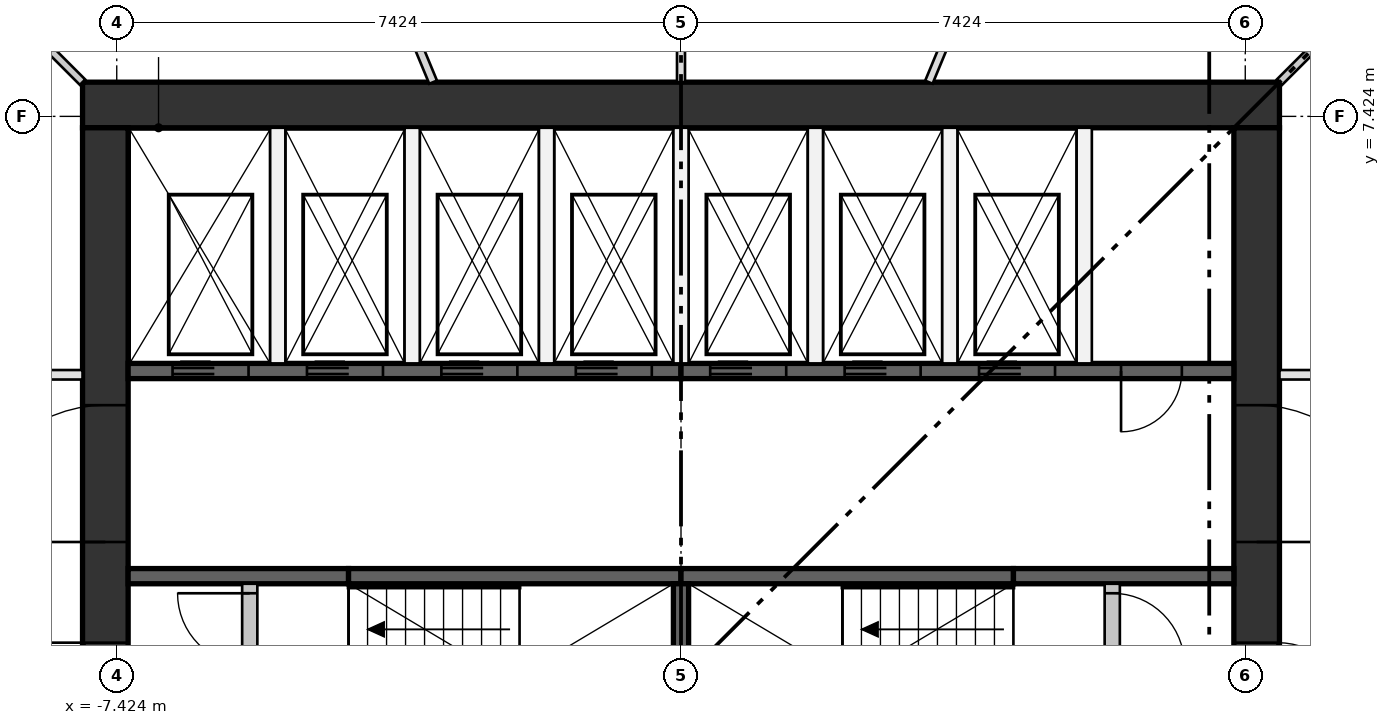
"""IFC4 building model, lengths in metres.
Left out: names, types, materials, properties, quantities, classifications, styles, units other than length and angle.
Written with IfcOpenShell. Run it as: python <this file> out.ifc"""

import sys

from ifc_helpers import new_model, si_unit, direction, frame, frame_2d, origin, place, context, subcontext, project, spatial, rectangle, extrude, element, fill, save


model = new_model("IFC4")
c1 = context("Model", 3, precision=1e-05, world=origin(), true_north=direction((0.0, 1.0)))
c2 = subcontext(c1, "Body", "Model", "MODEL_VIEW")
j1 = project(units=[si_unit("LENGTHUNIT", "METRE"), si_unit("PLANEANGLEUNIT", "RADIAN")], contexts=[c1])
p1 = place(None, origin())
s1 = spatial("IfcSite", under=j1, at=p1, CompositionType="ELEMENT")
p2 = place(p1, origin())
s2 = spatial("IfcBuilding", under=s1, at=p2, CompositionType="ELEMENT")
p3 = place(p2, frame((0.0, 0.0, 137.7)))
s3 = spatial("IfcBuildingStorey", under=s2, at=p3, CompositionType="ELEMENT", Elevation=137.7)
p4 = place(p3, frame((-7.874, 7.574, 0.0), z_axis=(0.0, 0.0, 1.0), x_axis=(1.0, 0.0, 0.0)))
e1 = element("IfcWall", 1, at=p4, inside=s3, PredefinedType="SHEAR", context=c2, shape_type="SweptSolid", body=[
    extrude(rectangle(XDim=15.748, YDim=0.6, at=frame_2d((7.874, 0.0))), origin(), (0.0, 0.0, 1.0), 3.35),
])
p5 = place(p3, frame((-7.574, -7.274, 0.0), z_axis=(0.0, 0.0, 1.0), x_axis=(0.0, 1.0, 0.0)))
e2 = element("IfcWall", 2, at=p5, inside=s3, PredefinedType="SHEAR", context=c2, shape_type="SweptSolid", body=[
    extrude(rectangle(XDim=14.548, YDim=0.6, at=frame_2d((7.274, 0.0))), origin(), (0.0, 0.0, 1.0), 3.35),
])
p6 = place(p5, frame((6.774, 0.0, 0.0)))
e3 = element("IfcOpeningElement", 3, at=p6, cuts=e2, PredefinedType="OPENING", context=c2, shape_type="SweptSolid", body=[
    extrude(rectangle(XDim=1.0, YDim=2.1, at=frame_2d((0.5, 1.05))), frame((0.0, 0.31, 0.0), z_axis=(0.0, -1.0, 0.0), x_axis=(1.0, 0.0, 0.0)), (0.0, 0.0, 1.0), 0.62),
])
p7 = place(p5, frame((3.649, 0.0, 0.0)))
e4 = element("IfcOpeningElement", 4, at=p7, cuts=e2, PredefinedType="OPENING", context=c2, shape_type="SweptSolid", body=[
    extrude(rectangle(XDim=1.8, YDim=2.1, at=frame_2d((0.9, 1.05))), frame((0.0, 0.31, 0.0), z_axis=(0.0, -1.0, 0.0), x_axis=(1.0, 0.0, 0.0)), (0.0, 0.0, 1.0), 0.62),
])
p8 = place(p5, frame((9.098, 0.0, 0.0)))
e5 = element("IfcOpeningElement", 5, at=p8, cuts=e2, PredefinedType="OPENING", context=c2, shape_type="SweptSolid", body=[
    extrude(rectangle(XDim=1.8, YDim=2.1, at=frame_2d((0.9, 1.05))), frame((0.0, 0.31, 0.0), z_axis=(0.0, -1.0, 0.0), x_axis=(1.0, 0.0, 0.0)), (0.0, 0.0, 1.0), 0.62),
])
p9 = place(p3, frame((7.574, -7.274, 0.0), z_axis=(0.0, 0.0, 1.0), x_axis=(0.0, 1.0, 0.0)))
e6 = element("IfcWall", 6, at=p9, inside=s3, PredefinedType="SHEAR", context=c2, shape_type="SweptSolid", body=[
    extrude(rectangle(XDim=14.548, YDim=0.6, at=frame_2d((7.274, 0.0))), origin(), (0.0, 0.0, 1.0), 3.35),
])
p10 = place(p9, frame((6.774, 0.0, 0.0)))
e7 = element("IfcOpeningElement", 7, at=p10, cuts=e6, PredefinedType="OPENING", context=c2, shape_type="SweptSolid", body=[
    extrude(rectangle(XDim=1.0, YDim=2.1, at=frame_2d((0.5, 1.05))), frame((0.0, 0.31, 0.0), z_axis=(0.0, -1.0, 0.0), x_axis=(1.0, 0.0, 0.0)), (0.0, 0.0, 1.0), 0.62),
])
p11 = place(p9, frame((3.649, 0.0, 0.0)))
e8 = element("IfcOpeningElement", 8, at=p11, cuts=e6, PredefinedType="OPENING", context=c2, shape_type="SweptSolid", body=[
    extrude(rectangle(XDim=1.8, YDim=2.1, at=frame_2d((0.9, 1.05))), frame((0.0, 0.31, 0.0), z_axis=(0.0, -1.0, 0.0), x_axis=(1.0, 0.0, 0.0)), (0.0, 0.0, 1.0), 0.62),
])
p12 = place(p9, frame((9.098, 0.0, 0.0)))
e9 = element("IfcOpeningElement", 9, at=p12, cuts=e6, PredefinedType="OPENING", context=c2, shape_type="SweptSolid", body=[
    extrude(rectangle(XDim=1.8, YDim=2.1, at=frame_2d((0.9, 1.05))), frame((0.0, 0.31, 0.0), z_axis=(0.0, -1.0, 0.0), x_axis=(1.0, 0.0, 0.0)), (0.0, 0.0, 1.0), 0.62),
])
p13 = place(p3, frame((-7.274, 4.074, 0.0), z_axis=(0.0, 0.0, 1.0), x_axis=(1.0, 0.0, 0.0)))
e10 = element("IfcWall", 10, at=p13, inside=s3, PredefinedType="SHEAR", context=c2, shape_type="SweptSolid", body=[
    extrude(rectangle(XDim=7.274, YDim=0.2, at=frame_2d((3.637, 0.0))), origin(), (0.0, 0.0, 1.0), 3.0),
])
p14 = place(p13, frame((0.584, 0.0, 0.0)))
e11 = element("IfcOpeningElement", 11, at=p14, cuts=e10, PredefinedType="OPENING", context=c2, shape_type="SweptSolid", body=[
    extrude(rectangle(XDim=1.0, YDim=2.1, at=frame_2d((0.5, 1.05))), frame((0.0, 0.11, 0.0), z_axis=(0.0, -1.0, 0.0), x_axis=(1.0, 0.0, 0.0)), (0.0, 0.0, 1.0), 0.22),
])
p15 = place(p13, frame((2.353, 0.0, 0.0)))
e12 = element("IfcOpeningElement", 12, at=p15, cuts=e10, PredefinedType="OPENING", context=c2, shape_type="SweptSolid", body=[
    extrude(rectangle(XDim=1.0, YDim=2.1, at=frame_2d((0.5, 1.05))), frame((0.0, 0.11, 0.0), z_axis=(0.0, -1.0, 0.0), x_axis=(1.0, 0.0, 0.0)), (0.0, 0.0, 1.0), 0.22),
])
p16 = place(p13, frame((4.121, 0.0, 0.0)))
e13 = element("IfcOpeningElement", 13, at=p16, cuts=e10, PredefinedType="OPENING", context=c2, shape_type="SweptSolid", body=[
    extrude(rectangle(XDim=1.0, YDim=2.1, at=frame_2d((0.5, 1.05))), frame((0.0, 0.11, 0.0), z_axis=(0.0, -1.0, 0.0), x_axis=(1.0, 0.0, 0.0)), (0.0, 0.0, 1.0), 0.22),
])
p17 = place(p13, frame((5.89, 0.0, 0.0)))
e14 = element("IfcOpeningElement", 14, at=p17, cuts=e10, PredefinedType="OPENING", context=c2, shape_type="SweptSolid", body=[
    extrude(rectangle(XDim=1.0, YDim=2.1, at=frame_2d((0.5, 1.05))), frame((0.0, 0.11, 0.0), z_axis=(0.0, -1.0, 0.0), x_axis=(1.0, 0.0, 0.0)), (0.0, 0.0, 1.0), 0.22),
])
p18 = place(p3, frame((0.0, 4.074, 0.0), z_axis=(0.0, 0.0, 1.0), x_axis=(1.0, 0.0, 0.0)))
e15 = element("IfcWall", 15, at=p18, inside=s3, PredefinedType="SHEAR", context=c2, shape_type="SweptSolid", body=[
    extrude(rectangle(XDim=7.274, YDim=0.2, at=frame_2d((3.637, 0.0))), origin(), (0.0, 0.0, 1.0), 3.0),
])
p19 = place(p18, frame((0.384, 0.0, 0.0)))
e16 = element("IfcOpeningElement", 16, at=p19, cuts=e15, PredefinedType="OPENING", context=c2, shape_type="SweptSolid", body=[
    extrude(rectangle(XDim=1.0, YDim=2.1, at=frame_2d((0.5, 1.05))), frame((0.0, 0.11, 0.0), z_axis=(0.0, -1.0, 0.0), x_axis=(1.0, 0.0, 0.0)), (0.0, 0.0, 1.0), 0.22),
])
p20 = place(p18, frame((2.153, 0.0, 0.0)))
e17 = element("IfcOpeningElement", 17, at=p20, cuts=e15, PredefinedType="OPENING", context=c2, shape_type="SweptSolid", body=[
    extrude(rectangle(XDim=1.0, YDim=2.1, at=frame_2d((0.5, 1.05))), frame((0.0, 0.11, 0.0), z_axis=(0.0, -1.0, 0.0), x_axis=(1.0, 0.0, 0.0)), (0.0, 0.0, 1.0), 0.22),
])
p21 = place(p18, frame((3.921, 0.0, 0.0)))
e18 = element("IfcOpeningElement", 18, at=p21, cuts=e15, PredefinedType="OPENING", context=c2, shape_type="SweptSolid", body=[
    extrude(rectangle(XDim=1.0, YDim=2.1, at=frame_2d((0.5, 1.05))), frame((0.0, 0.11, 0.0), z_axis=(0.0, -1.0, 0.0), x_axis=(1.0, 0.0, 0.0)), (0.0, 0.0, 1.0), 0.22),
])
p22 = place(p18, frame((5.79, 0.0, 0.0)))
e19 = element("IfcOpeningElement", 19, at=p22, cuts=e15, PredefinedType="OPENING", context=c2, shape_type="SweptSolid", body=[
    extrude(rectangle(XDim=0.8, YDim=2.1, at=frame_2d((0.4, 1.05))), frame((0.0, 0.11, 0.0), z_axis=(0.0, -1.0, 0.0), x_axis=(1.0, 0.0, 0.0)), (0.0, 0.0, 1.0), 0.22),
])
p23 = place(p3, frame((-7.274, 1.375, 0.0), z_axis=(0.0, 0.0, 1.0), x_axis=(1.0, 0.0, 0.0)))
e20 = element("IfcWall", 20, at=p23, inside=s3, PredefinedType="SHEAR", context=c2, shape_type="SweptSolid", body=[
    extrude(rectangle(XDim=2.9, YDim=0.2, at=frame_2d((1.45, 0.0))), origin(), (0.0, 0.0, 1.0), 3.0),
])
for number, where, z_axis, x_axis in (
    (21, (-4.374, 1.375, 0.0), (0.0, 0.0, 1.0), (1.0, 0.0, 0.0)),
    (22, (0.0, 1.375, 0.0), (0.0, 0.0, 1.0), (1.0, 0.0, 0.0)),
):
    element("IfcWall", number, at=place(p3, frame(where, z_axis=z_axis, x_axis=x_axis)), inside=s3, PredefinedType="SHEAR", context=c2, shape_type="SweptSolid", body=[
        extrude(rectangle(XDim=4.374, YDim=0.2, at=frame_2d((2.187, 0.0))), origin(), (0.0, 0.0, 1.0), 3.0),
    ])
p24 = place(p3, frame((4.374, 1.375, 0.0), z_axis=(0.0, 0.0, 1.0), x_axis=(1.0, 0.0, 0.0)))
e23 = element("IfcWall", 23, at=p24, inside=s3, PredefinedType="SHEAR", context=c2, shape_type="SweptSolid", body=[
    extrude(rectangle(XDim=2.9, YDim=0.2, at=frame_2d((1.45, 0.0))), origin(), (0.0, 0.0, 1.0), 3.0),
])
p25 = place(p3, frame((0.0, -1.275, 0.0), z_axis=(0.0, 0.0, 1.0), x_axis=(0.0, 1.0, 0.0)))
e24 = element("IfcWall", 24, at=p25, inside=s3, PredefinedType="SHEAR", context=c2, shape_type="SweptSolid", body=[
    extrude(rectangle(XDim=2.55, YDim=0.2, at=frame_2d((1.275, 0.0))), origin(), (0.0, 0.0, 1.0), 3.0),
])
for number, where, z_axis, x_axis in (
    (25, (-5.305, 4.174, 0.0), (0.0, 0.0, 1.0), (0.0, 1.0, 0.0)),
    (26, (-3.537, 4.174, 0.0), (0.0, 0.0, 1.0), (0.0, 1.0, 0.0)),
    (27, (-1.769, 4.174, 0.0), (0.0, 0.0, 1.0), (0.0, 1.0, 0.0)),
    (28, (0.0, 4.174, 0.0), (0.0, 0.0, 1.0), (0.0, 1.0, 0.0)),
    (29, (1.769, 4.174, 0.0), (0.0, 0.0, 1.0), (0.0, 1.0, 0.0)),
    (30, (3.537, 4.174, 0.0), (0.0, 0.0, 1.0), (0.0, 1.0, 0.0)),
    (31, (5.305, 4.174, 0.0), (0.0, 0.0, 1.0), (0.0, 1.0, 0.0)),
):
    element("IfcWall", number, at=place(p3, frame(where, z_axis=z_axis, x_axis=x_axis)), inside=s3, PredefinedType="PARTITIONING", context=c2, shape_type="SweptSolid", body=[
        extrude(rectangle(XDim=3.1, YDim=0.2, at=frame_2d((1.55, 0.0))), origin(), (0.0, 0.0, 1.0), 3.0),
    ])
p26 = place(p3, frame((-5.674, -1.275, 0.0), z_axis=(0.0, 0.0, 1.0), x_axis=(0.0, 1.0, 0.0)))
e32 = element("IfcWall", 32, at=p26, inside=s3, PredefinedType="PARTITIONING", context=c2, shape_type="SweptSolid", body=[
    extrude(rectangle(XDim=2.55, YDim=0.2, at=frame_2d((1.275, 0.0))), origin(), (0.0, 0.0, 1.0), 3.0),
])
p27 = place(p26, frame((0.125, 0.0, 0.0)))
e33 = element("IfcOpeningElement", 33, at=p27, cuts=e32, PredefinedType="OPENING", context=c2, shape_type="SweptSolid", body=[
    extrude(rectangle(XDim=0.95, YDim=2.1, at=frame_2d((0.475, 1.05))), frame((0.0, 0.11, 0.0), z_axis=(0.0, -1.0, 0.0), x_axis=(1.0, 0.0, 0.0)), (0.0, 0.0, 1.0), 0.22),
])
p28 = place(p26, frame((1.475, 0.0, 0.0)))
e34 = element("IfcOpeningElement", 34, at=p28, cuts=e32, PredefinedType="OPENING", context=c2, shape_type="SweptSolid", body=[
    extrude(rectangle(XDim=0.95, YDim=2.1, at=frame_2d((0.475, 1.05))), frame((0.0, 0.11, 0.0), z_axis=(0.0, -1.0, 0.0), x_axis=(1.0, 0.0, 0.0)), (0.0, 0.0, 1.0), 0.22),
])
p29 = place(p3, frame((5.674, -1.275, 0.0), z_axis=(0.0, 0.0, 1.0), x_axis=(0.0, 1.0, 0.0)))
e35 = element("IfcWall", 35, at=p29, inside=s3, PredefinedType="PARTITIONING", context=c2, shape_type="SweptSolid", body=[
    extrude(rectangle(XDim=2.55, YDim=0.2, at=frame_2d((1.275, 0.0))), origin(), (0.0, 0.0, 1.0), 3.0),
])
p30 = place(p29, frame((0.125, 0.0, 0.0)))
e36 = element("IfcOpeningElement", 36, at=p30, cuts=e35, PredefinedType="OPENING", context=c2, shape_type="SweptSolid", body=[
    extrude(rectangle(XDim=0.95, YDim=2.1, at=frame_2d((0.475, 1.05))), frame((0.0, 0.11, 0.0), z_axis=(0.0, -1.0, 0.0), x_axis=(1.0, 0.0, 0.0)), (0.0, 0.0, 1.0), 0.22),
])
p31 = place(p29, frame((1.475, 0.0, 0.0)))
e37 = element("IfcOpeningElement", 37, at=p31, cuts=e35, PredefinedType="OPENING", context=c2, shape_type="SweptSolid", body=[
    extrude(rectangle(XDim=0.95, YDim=2.1, at=frame_2d((0.475, 1.05))), frame((0.0, 0.11, 0.0), z_axis=(0.0, -1.0, 0.0), x_axis=(1.0, 0.0, 0.0)), (0.0, 0.0, 1.0), 0.22),
])
p32 = place(p3, frame((7.874, 4.024, 0.0), z_axis=(0.0, 0.0, 1.0), x_axis=(1.0, 0.0, 0.0)))
e38 = element("IfcWall", 38, at=p32, inside=s3, PredefinedType="PARTITIONING", context=c2, shape_type="SweptSolid", body=[
    extrude(rectangle(XDim=4.983, YDim=0.125, at=frame_2d((2.491, 0.0))), origin(), (0.0, 0.0, 1.0), 3.0),
])
p33 = place(p32, frame((2.0, 0.0, 0.0)))
e39 = element("IfcOpeningElement", 39, at=p33, cuts=e38, PredefinedType="OPENING", context=c2, shape_type="SweptSolid", body=[
    extrude(rectangle(XDim=1.0, YDim=2.1, at=frame_2d((0.5, 1.05))), frame((0.0, 0.073, 0.0), z_axis=(0.0, -1.0, 0.0), x_axis=(1.0, 0.0, 0.0)), (0.0, 0.0, 1.0), 0.145),
])
p34 = place(p3, frame((-14.332, 4.024, 0.0), z_axis=(0.0, 0.0, 1.0), x_axis=(1.0, 0.0, 0.0)))
e40 = element("IfcWall", 40, at=p34, inside=s3, PredefinedType="PARTITIONING", context=c2, shape_type="SweptSolid", body=[
    extrude(rectangle(XDim=6.458, YDim=0.125, at=frame_2d((3.229, 0.0))), origin(), (0.0, 0.0, 1.0), 3.0),
])
p35 = place(p34, frame((2.7, 0.0, 0.0)))
e41 = element("IfcOpeningElement", 41, at=p35, cuts=e40, PredefinedType="OPENING", context=c2, shape_type="SweptSolid", body=[
    extrude(rectangle(XDim=1.0, YDim=2.1, at=frame_2d((0.5, 1.05))), frame((0.0, 0.073, 0.0), z_axis=(0.0, -1.0, 0.0), x_axis=(1.0, 0.0, 0.0)), (0.0, 0.0, 1.0), 0.145),
])
p36 = place(p3, frame((7.874, 7.874, 0.0), z_axis=(0.0, 0.0, 1.0), x_axis=(0.707106781187, 0.707106781187, 0.0)))
e42 = element("IfcWall", 42, at=p36, inside=s3, PredefinedType="PARTITIONING", context=c2, shape_type="SweptSolid", body=[
    extrude(rectangle(XDim=6.714, YDim=0.1, at=frame_2d((3.357, 0.0))), origin(), (0.0, 0.0, 1.0), 3.0),
])
p37 = place(p36, frame((2.7, 0.0, 0.0)))
e43 = element("IfcOpeningElement", 43, at=p37, cuts=e42, PredefinedType="OPENING", context=c2, shape_type="SweptSolid", body=[
    extrude(rectangle(XDim=1.0, YDim=2.1, at=frame_2d((0.5, 1.05))), frame((0.0, 0.06, 0.0), z_axis=(0.0, -1.0, 0.0), x_axis=(1.0, 0.0, 0.0)), (0.0, 0.0, 1.0), 0.12),
])
p38 = place(p3, frame((3.261, 7.874, 0.0), z_axis=(0.0, 0.0, 1.0), x_axis=(0.38268632394, 0.923878334777, 0.0)))
e44 = element("IfcWall", 44, at=p38, inside=s3, PredefinedType="PARTITIONING", context=c2, shape_type="SweptSolid", body=[
    extrude(rectangle(XDim=5.457, YDim=0.105, at=frame_2d((2.729, 0.0))), origin(), (0.0, 0.0, 1.0), 3.0),
])
p39 = place(p38, frame((2.2, 0.0, 0.0)))
e45 = element("IfcOpeningElement", 45, at=p39, cuts=e44, PredefinedType="OPENING", context=c2, shape_type="SweptSolid", body=[
    extrude(rectangle(XDim=1.0, YDim=2.1, at=frame_2d((0.5, 1.05))), frame((0.0, 0.062, 0.0), z_axis=(0.0, -1.0, 0.0), x_axis=(1.0, 0.0, 0.0)), (0.0, 0.0, 1.0), 0.125),
])
p40 = place(p3, frame((0.0, 7.874, 0.0), z_axis=(0.0, 0.0, 1.0), x_axis=(0.0, 1.0, 0.0)))
e46 = element("IfcWall", 46, at=p40, inside=s3, PredefinedType="PARTITIONING", context=c2, shape_type="SweptSolid", body=[
    extrude(rectangle(XDim=6.106, YDim=0.105, at=frame_2d((3.053, 0.0))), origin(), (0.0, 0.0, 1.0), 3.0),
])
p41 = place(p3, frame((-3.261, 7.874, 0.0), z_axis=(0.0, 0.0, 1.0), x_axis=(-0.38268632394, 0.923878334777, 0.0)))
e47 = element("IfcWall", 47, at=p41, inside=s3, PredefinedType="PARTITIONING", context=c2, shape_type="SweptSolid", body=[
    extrude(rectangle(XDim=5.457, YDim=0.11, at=frame_2d((2.729, 0.0))), origin(), (0.0, 0.0, 1.0), 3.0),
])
p42 = place(p3, frame((-12.622, 12.622, 0.0), z_axis=(0.0, 0.0, 1.0), x_axis=(0.707106781187, -0.707106781187, 0.0)))
e48 = element("IfcWall", 48, at=p42, inside=s3, PredefinedType="PARTITIONING", context=c2, shape_type="SweptSolid", body=[
    extrude(rectangle(XDim=6.714, YDim=0.1, at=frame_2d((3.357, 0.0))), origin(), (0.0, 0.0, 1.0), 3.0),
])
p43 = place(p42, frame((3.0, 0.0, 0.0)))
e49 = element("IfcOpeningElement", 49, at=p43, cuts=e48, PredefinedType="OPENING", context=c2, shape_type="SweptSolid", body=[
    extrude(rectangle(XDim=1.0, YDim=2.1, at=frame_2d((0.5, 1.05))), frame((0.0, 0.06, 0.0), z_axis=(0.0, -1.0, 0.0), x_axis=(1.0, 0.0, 0.0)), (0.0, 0.0, 1.0), 0.12),
])
p44 = place(p14, frame((1.0, 0.0, 0.0), z_axis=(0.0, 0.0, 1.0), x_axis=(-1.0, 0.0, 0.0)))
e50 = element("IfcDoor", 50, at=p44, inside=s3, OperationType="DOUBLE_DOOR_SLIDING", PredefinedType="DOOR", context=c2, shape_type="SweptSolid", body=[
    extrude(rectangle(XDim=1.0, YDim=2.1, at=frame_2d((0.5, 1.05))), frame((0.0, 0.025, 0.0), z_axis=(0.0, -1.0, 0.0), x_axis=(1.0, 0.0, 0.0)), (0.0, 0.0, 1.0), 0.05),
])
fill(e11, e50)
p45 = place(p15, frame((1.0, 0.0, 0.0), z_axis=(0.0, 0.0, 1.0), x_axis=(-1.0, 0.0, 0.0)))
e51 = element("IfcDoor", 51, at=p45, inside=s3, OperationType="DOUBLE_DOOR_SLIDING", PredefinedType="DOOR", context=c2, shape_type="SweptSolid", body=[
    extrude(rectangle(XDim=1.0, YDim=2.1, at=frame_2d((0.5, 1.05))), frame((0.0, 0.025, 0.0), z_axis=(0.0, -1.0, 0.0), x_axis=(1.0, 0.0, 0.0)), (0.0, 0.0, 1.0), 0.05),
])
fill(e12, e51)
p46 = place(p16, frame((1.0, 0.0, 0.0), z_axis=(0.0, 0.0, 1.0), x_axis=(-1.0, 0.0, 0.0)))
e52 = element("IfcDoor", 52, at=p46, inside=s3, OperationType="DOUBLE_DOOR_SLIDING", PredefinedType="DOOR", context=c2, shape_type="SweptSolid", body=[
    extrude(rectangle(XDim=1.0, YDim=2.1, at=frame_2d((0.5, 1.05))), frame((0.0, 0.025, 0.0), z_axis=(0.0, -1.0, 0.0), x_axis=(1.0, 0.0, 0.0)), (0.0, 0.0, 1.0), 0.05),
])
fill(e13, e52)
p47 = place(p17, frame((1.0, 0.0, 0.0), z_axis=(0.0, 0.0, 1.0), x_axis=(-1.0, 0.0, 0.0)))
e53 = element("IfcDoor", 53, at=p47, inside=s3, OperationType="DOUBLE_DOOR_SLIDING", PredefinedType="DOOR", context=c2, shape_type="SweptSolid", body=[
    extrude(rectangle(XDim=1.0, YDim=2.1, at=frame_2d((0.5, 1.05))), frame((0.0, 0.025, 0.0), z_axis=(0.0, -1.0, 0.0), x_axis=(1.0, 0.0, 0.0)), (0.0, 0.0, 1.0), 0.05),
])
fill(e14, e53)
p48 = place(p19, frame((1.0, 0.0, 0.0), z_axis=(0.0, 0.0, 1.0), x_axis=(-1.0, 0.0, 0.0)))
e54 = element("IfcDoor", 54, at=p48, inside=s3, OperationType="DOUBLE_DOOR_SLIDING", PredefinedType="DOOR", context=c2, shape_type="SweptSolid", body=[
    extrude(rectangle(XDim=1.0, YDim=2.1, at=frame_2d((0.5, 1.05))), frame((0.0, 0.025, 0.0), z_axis=(0.0, -1.0, 0.0), x_axis=(1.0, 0.0, 0.0)), (0.0, 0.0, 1.0), 0.05),
])
fill(e16, e54)
p49 = place(p20, frame((1.0, 0.0, 0.0), z_axis=(0.0, 0.0, 1.0), x_axis=(-1.0, 0.0, 0.0)))
e55 = element("IfcDoor", 55, at=p49, inside=s3, OperationType="DOUBLE_DOOR_SLIDING", PredefinedType="DOOR", context=c2, shape_type="SweptSolid", body=[
    extrude(rectangle(XDim=1.0, YDim=2.1, at=frame_2d((0.5, 1.05))), frame((0.0, 0.025, 0.0), z_axis=(0.0, -1.0, 0.0), x_axis=(1.0, 0.0, 0.0)), (0.0, 0.0, 1.0), 0.05),
])
fill(e17, e55)
p50 = place(p21, frame((1.0, 0.0, 0.0), z_axis=(0.0, 0.0, 1.0), x_axis=(-1.0, 0.0, 0.0)))
e56 = element("IfcDoor", 56, at=p50, inside=s3, OperationType="DOUBLE_DOOR_SLIDING", PredefinedType="DOOR", context=c2, shape_type="SweptSolid", body=[
    extrude(rectangle(XDim=1.0, YDim=2.1, at=frame_2d((0.5, 1.05))), frame((0.0, 0.025, 0.0), z_axis=(0.0, -1.0, 0.0), x_axis=(1.0, 0.0, 0.0)), (0.0, 0.0, 1.0), 0.05),
])
fill(e18, e56)
p51 = place(p28, origin())
e57 = element("IfcDoor", 57, at=p51, inside=s3, OperationType="SINGLE_SWING_RIGHT", PredefinedType="DOOR", context=c2, shape_type="SweptSolid", body=[
    extrude(rectangle(XDim=0.95, YDim=2.1, at=frame_2d((0.475, 1.05))), frame((0.0, 0.025, 0.0), z_axis=(0.0, -1.0, 0.0), x_axis=(1.0, 0.0, 0.0)), (0.0, 0.0, 1.0), 0.05),
])
fill(e34, e57)
p52 = place(p31, frame((0.95, 0.0, 0.0), z_axis=(0.0, 0.0, 1.0), x_axis=(-1.0, 0.0, 0.0)))
e58 = element("IfcDoor", 58, at=p52, inside=s3, OperationType="SINGLE_SWING_LEFT", PredefinedType="DOOR", context=c2, shape_type="SweptSolid", body=[
    extrude(rectangle(XDim=0.95, YDim=2.1, at=frame_2d((0.475, 1.05))), frame((0.0, 0.025, 0.0), z_axis=(0.0, -1.0, 0.0), x_axis=(1.0, 0.0, 0.0)), (0.0, 0.0, 1.0), 0.05),
])
fill(e37, e58)
p53 = place(p22, frame((0.8, 0.0, 0.0), z_axis=(0.0, 0.0, 1.0), x_axis=(-1.0, 0.0, 0.0)))
e59 = element("IfcDoor", 59, at=p53, inside=s3, OperationType="SINGLE_SWING_LEFT", PredefinedType="DOOR", context=c2, shape_type="SweptSolid", body=[
    extrude(rectangle(XDim=0.8, YDim=2.1, at=frame_2d((0.4, 1.05))), frame((0.0, 0.025, 0.0), z_axis=(0.0, -1.0, 0.0), x_axis=(1.0, 0.0, 0.0)), (0.0, 0.0, 1.0), 0.05),
])
fill(e19, e59)
p54 = place(p6, origin())
e60 = element("IfcDoor", 60, at=p54, inside=s3, OperationType="SINGLE_SWING_RIGHT", PredefinedType="DOOR", context=c2, shape_type="SweptSolid", body=[
    extrude(rectangle(XDim=1.0, YDim=2.1, at=frame_2d((0.5, 1.05))), frame((0.0, 0.3, 0.0), z_axis=(0.0, -1.0, 0.0), x_axis=(1.0, 0.0, 0.0)), (0.0, 0.0, 1.0), 0.05),
])
fill(e3, e60)
p55 = place(p8, origin())
e61 = element("IfcDoor", 61, at=p55, inside=s3, OperationType="DOUBLE_DOOR_SINGLE_SWING", PredefinedType="DOOR", context=c2, shape_type="SweptSolid", body=[
    extrude(rectangle(XDim=1.8, YDim=2.1, at=frame_2d((0.9, 1.05))), frame((0.0, 0.025, 0.0), z_axis=(0.0, -1.0, 0.0), x_axis=(1.0, 0.0, 0.0)), (0.0, 0.0, 1.0), 0.05),
])
fill(e5, e61)
p56 = place(p10, frame((1.0, 0.0, 0.0), z_axis=(0.0, 0.0, 1.0), x_axis=(-1.0, 0.0, 0.0)))
e62 = element("IfcDoor", 62, at=p56, inside=s3, OperationType="SINGLE_SWING_LEFT", PredefinedType="DOOR", context=c2, shape_type="SweptSolid", body=[
    extrude(rectangle(XDim=1.0, YDim=2.1, at=frame_2d((0.5, 1.05))), frame((0.0, 0.3, 0.0), z_axis=(0.0, -1.0, 0.0), x_axis=(1.0, 0.0, 0.0)), (0.0, 0.0, 1.0), 0.05),
])
fill(e7, e62)
p57 = place(p12, frame((1.8, 0.0, 0.0), z_axis=(0.0, 0.0, 1.0), x_axis=(-1.0, 0.0, 0.0)))
e63 = element("IfcDoor", 63, at=p57, inside=s3, OperationType="DOUBLE_DOOR_SINGLE_SWING", PredefinedType="DOOR", context=c2, shape_type="SweptSolid", body=[
    extrude(rectangle(XDim=1.8, YDim=2.1, at=frame_2d((0.9, 1.05))), frame((0.0, 0.025, 0.0), z_axis=(0.0, -1.0, 0.0), x_axis=(1.0, 0.0, 0.0)), (0.0, 0.0, 1.0), 0.05),
])
fill(e9, e63)
save(model, sys.argv[1])
